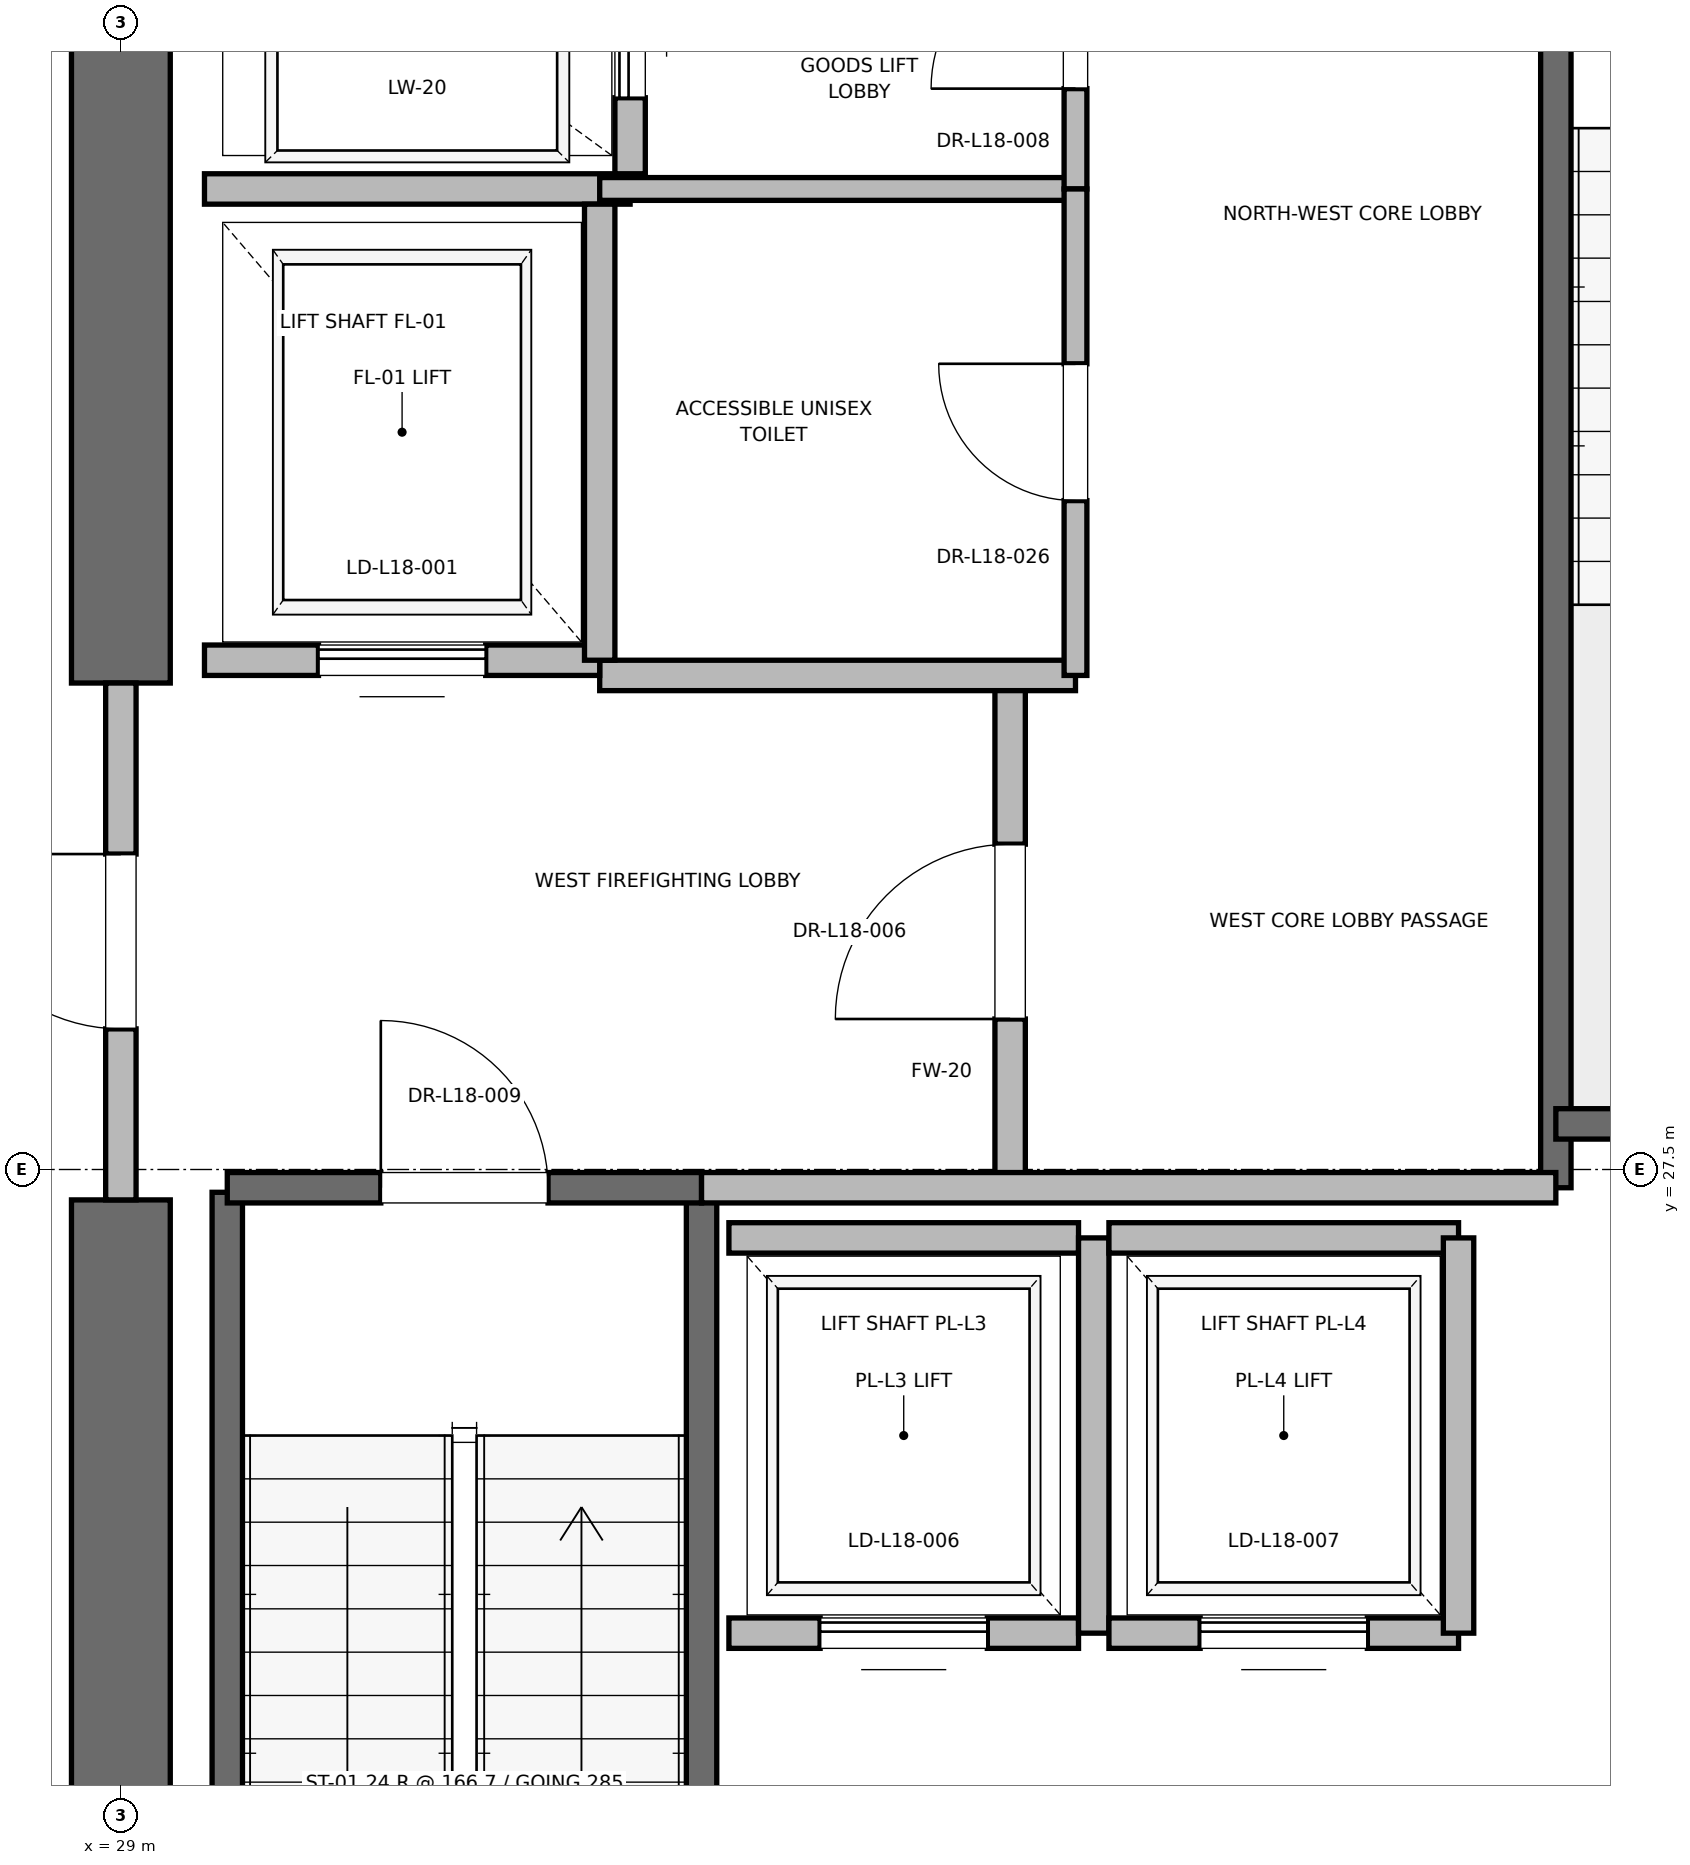
"""IFC4 building model, lengths in metres.
Left out: names, types, materials, properties, quantities, classifications, styles, units other than length and angle.
Written with IfcOpenShell. Run it as: python <this file> out.ifc"""

import sys

from ifc_helpers import new_model, si_unit, direction, frame, frame_2d, origin, place, context, subcontext, project, spatial, rectangle, extrude, element, fill, save


model = new_model("IFC4")
c1 = context("Model", 3, precision=1e-05, world=origin(), true_north=direction((0.0, 1.0)))
c2 = subcontext(c1, "Body", "Model", "MODEL_VIEW")
j1 = project(units=[si_unit("LENGTHUNIT", "METRE"), si_unit("PLANEANGLEUNIT", "RADIAN")], contexts=[c1])
p1 = place(None, origin())
s1 = spatial("IfcSite", under=j1, at=p1, CompositionType="ELEMENT")
p2 = place(p1, origin())
s2 = spatial("IfcBuilding", under=s1, at=p2, CompositionType="ELEMENT")
p3 = place(p2, frame((0.0, 0.0, 79.6)))
s3 = spatial("IfcBuildingStorey", under=s2, at=p3, CompositionType="ELEMENT", Elevation=79.6)
p4 = place(p3, frame((29.0, 18.5, 0.0), z_axis=(0.0, 0.0, 1.0), x_axis=(0.0, 1.0, 0.0)))
e1 = element("IfcWall", 1, at=p4, inside=s3, PredefinedType="SHEAR", context=c2, shape_type="SweptSolid", body=[
    extrude(rectangle(XDim=8.8, YDim=0.65, at=frame_2d((4.4, 0.0))), origin(), (0.0, 0.0, 1.0), 3.76),
])
p5 = place(p3, frame((29.0, 30.7, 0.0), z_axis=(0.0, 0.0, 1.0), x_axis=(0.0, 1.0, 0.0)))
e2 = element("IfcWall", 2, at=p5, inside=s3, PredefinedType="SHEAR", context=c2, shape_type="SweptSolid", body=[
    extrude(rectangle(XDim=5.8, YDim=0.65, at=frame_2d((2.9, 0.0))), origin(), (0.0, 0.0, 1.0), 3.76),
])
p6 = place(p3, frame((29.7, 19.2, 0.0), z_axis=(0.0, 0.0, 1.0), x_axis=(0.0, 1.0, 0.0)))
e3 = element("IfcWall", 3, at=p6, inside=s3, PredefinedType="SOLIDWALL", context=c2, shape_type="SweptSolid", body=[
    extrude(rectangle(XDim=8.15, YDim=0.2, at=frame_2d((4.075, 0.0))), origin(), (0.0, 0.0, 1.0), 3.76),
])
p7 = place(p3, frame((32.82, 18.6, 0.0), z_axis=(0.0, 0.0, 1.0), x_axis=(0.0, 1.0, 0.0)))
e4 = element("IfcWall", 4, at=p7, inside=s3, PredefinedType="SOLIDWALL", context=c2, shape_type="SweptSolid", body=[
    extrude(rectangle(XDim=8.78, YDim=0.2, at=frame_2d((4.39, 0.0))), origin(), (0.0, 0.0, 1.0), 3.76),
])
p8 = place(p3, frame((29.7, 27.38, 0.0), z_axis=(0.0, 0.0, 1.0), x_axis=(1.0, 0.0, 0.0)))
e5 = element("IfcWall", 5, at=p8, inside=s3, PredefinedType="SOLIDWALL", context=c2, shape_type="SweptSolid", body=[
    extrude(rectangle(XDim=3.12, YDim=0.2, at=frame_2d((1.56, 0.0))), origin(), (0.0, 0.0, 1.0), 3.76),
])
p9 = place(p8, frame((1.01, 0.0, 0.0)))
e6 = element("IfcOpeningElement", 6, at=p9, cuts=e5, PredefinedType="OPENING", context=c2, shape_type="SweptSolid", body=[
    extrude(rectangle(XDim=1.1, YDim=2.15, at=frame_2d((0.55, 1.075))), frame((0.0, 0.1, 0.0), z_axis=(0.0, -1.0, 0.0), x_axis=(1.0, 0.0, 0.0)), (0.0, 0.0, 1.0), 0.2),
])
p10 = place(p3, frame((38.44, 27.38, 0.0), z_axis=(0.0, 0.0, 1.0), x_axis=(0.0, 1.0, 0.0)))
e7 = element("IfcWall", 7, at=p10, inside=s3, PredefinedType="SOLIDWALL", context=c2, shape_type="SweptSolid", body=[
    extrude(rectangle(XDim=8.87, YDim=0.2, at=frame_2d((4.435, 0.0))), origin(), (0.0, 0.0, 1.0), 3.76),
])
p11 = place(p3, frame((38.44, 27.8, 0.0), z_axis=(0.0, 0.0, 1.0), x_axis=(1.0, 0.0, 0.0)))
e8 = element("IfcWall", 8, at=p11, inside=s3, PredefinedType="SOLIDWALL", context=c2, shape_type="SweptSolid", body=[
    extrude(rectangle(XDim=3.32, YDim=0.2, at=frame_2d((1.66, 0.0))), origin(), (0.0, 0.0, 1.0), 3.76),
])
p12 = place(p3, frame((34.85, 27.38, 0.0), z_axis=(0.0, 0.0, 1.0), x_axis=(0.0, 1.0, 0.0)))
e9 = element("IfcWall", 9, at=p12, inside=s3, PredefinedType="PARTITIONING", context=c2, shape_type="SweptSolid", body=[
    extrude(rectangle(XDim=3.37, YDim=0.2, at=frame_2d((1.685, 0.0))), origin(), (0.0, 0.0, 1.0), 3.76),
])
p13 = place(p12, frame((1.11, 0.0, 0.0)))
e10 = element("IfcOpeningElement", 10, at=p13, cuts=e9, PredefinedType="OPENING", context=c2, shape_type="SweptSolid", body=[
    extrude(rectangle(XDim=1.15, YDim=2.2, at=frame_2d((0.575, 1.1))), frame((0.0, 0.1, 0.0), z_axis=(0.0, -1.0, 0.0), x_axis=(1.0, 0.0, 0.0)), (0.0, 0.0, 1.0), 0.2),
])
p14 = place(p3, frame((29.0, 27.3, 0.0), z_axis=(0.0, 0.0, 1.0), x_axis=(0.0, 1.0, 0.0)))
e11 = element("IfcWall", 11, at=p14, inside=s3, PredefinedType="PARTITIONING", context=c2, shape_type="SweptSolid", body=[
    extrude(rectangle(XDim=3.4, YDim=0.2, at=frame_2d((1.7, 0.0))), origin(), (0.0, 0.0, 1.0), 2.54),
])
p15 = place(p14, frame((1.125, 0.0, 0.0)))
e12 = element("IfcOpeningElement", 12, at=p15, cuts=e11, PredefinedType="OPENING", context=c2, shape_type="SweptSolid", body=[
    extrude(rectangle(XDim=1.15, YDim=2.2, at=frame_2d((0.575, 1.1))), frame((0.0, 0.1, 0.0), z_axis=(0.0, -1.0, 0.0), x_axis=(1.0, 0.0, 0.0)), (0.0, 0.0, 1.0), 0.2),
])
p16 = place(p3, frame((32.82, 27.38, 0.0), z_axis=(0.0, 0.0, 1.0), x_axis=(1.0, 0.0, 0.0)))
e13 = element("IfcWall", 13, at=p16, inside=s3, PredefinedType="PARTITIONING", context=c2, shape_type="SweptSolid", body=[
    extrude(rectangle(XDim=5.62, YDim=0.2, at=frame_2d((2.81, 0.0))), origin(), (0.0, 0.0, 1.0), 3.76),
])
p17 = place(p3, frame((32.15, 30.75, 0.0), z_axis=(0.0, 0.0, 1.0), x_axis=(1.0, 0.0, 0.0)))
e14 = element("IfcWall", 14, at=p17, inside=s3, PredefinedType="PARTITIONING", context=c2, shape_type="SweptSolid", body=[
    extrude(rectangle(XDim=3.13, YDim=0.2, at=frame_2d((1.565, 0.0))), origin(), (0.0, 0.0, 1.0), 3.76),
])
p18 = place(p3, frame((29.55, 30.85, 0.0), z_axis=(0.0, 0.0, 1.0), x_axis=(1.0, 0.0, 0.0)))
e15 = element("IfcWall", 15, at=p18, inside=s3, PredefinedType="SOLIDWALL", context=c2, shape_type="SweptSolid", body=[
    extrude(rectangle(XDim=2.6, YDim=0.2, at=frame_2d((1.3, 0.0))), origin(), (0.0, 0.0, 1.0), 2.54),
])
p19 = place(p18, frame((0.75, 0.0, 0.0)))
e16 = element("IfcOpeningElement", 16, at=p19, cuts=e15, PredefinedType="OPENING", context=c2, shape_type="SweptSolid", body=[
    extrude(rectangle(XDim=1.1, YDim=2.2, at=frame_2d((0.55, 1.1))), frame((0.0, 0.1, 0.0), z_axis=(0.0, -1.0, 0.0), x_axis=(1.0, 0.0, 0.0)), (0.0, 0.0, 1.0), 0.2),
])
p20 = place(p3, frame((29.55, 33.95, 0.0), z_axis=(0.0, 0.0, 1.0), x_axis=(1.0, 0.0, 0.0)))
e17 = element("IfcWall", 17, at=p20, inside=s3, PredefinedType="SOLIDWALL", context=c2, shape_type="SweptSolid", body=[
    extrude(rectangle(XDim=2.8, YDim=0.2, at=frame_2d((1.4, 0.0))), origin(), (0.0, 0.0, 1.0), 3.76),
])
p21 = place(p3, frame((32.15, 30.85, 0.0), z_axis=(0.0, 0.0, 1.0), x_axis=(0.0, 1.0, 0.0)))
e18 = element("IfcWall", 18, at=p21, inside=s3, PredefinedType="SOLIDWALL", context=c2, shape_type="SweptSolid", body=[
    extrude(rectangle(XDim=3.0, YDim=0.2, at=frame_2d((1.5, 0.0))), origin(), (0.0, 0.0, 1.0), 3.76),
])
p22 = place(p3, frame((32.35, 34.05, 0.0), z_axis=(0.0, 0.0, 1.0), x_axis=(0.0, 1.0, 0.0)))
e19 = element("IfcWall", 19, at=p22, inside=s3, PredefinedType="SOLIDWALL", context=c2, shape_type="SweptSolid", body=[
    extrude(rectangle(XDim=2.1, YDim=0.2, at=frame_2d((1.05, 0.0))), origin(), (0.0, 0.0, 1.0), 3.76),
])
p23 = place(p22, frame((0.5, 0.0, 0.0)))
e20 = element("IfcOpeningElement", 20, at=p23, cuts=e19, PredefinedType="OPENING", context=c2, shape_type="SweptSolid", body=[
    extrude(rectangle(XDim=1.1, YDim=2.2, at=frame_2d((0.55, 1.1))), frame((0.0, 0.1, 0.0), z_axis=(0.0, -1.0, 0.0), x_axis=(1.0, 0.0, 0.0)), (0.0, 0.0, 1.0), 0.2),
])
p24 = place(p3, frame((33.0, 24.45, 0.0), z_axis=(0.0, 0.0, 1.0), x_axis=(1.0, 0.0, 0.0)))
e21 = element("IfcWall", 21, at=p24, inside=s3, PredefinedType="SOLIDWALL", context=c2, shape_type="SweptSolid", body=[
    extrude(rectangle(XDim=2.3, YDim=0.2, at=frame_2d((1.15, 0.0))), origin(), (0.0, 0.0, 1.0), 3.76),
])
p25 = place(p24, frame((0.6, 0.0, 0.0)))
e22 = element("IfcOpeningElement", 22, at=p25, cuts=e21, PredefinedType="OPENING", context=c2, shape_type="SweptSolid", body=[
    extrude(rectangle(XDim=1.1, YDim=2.2, at=frame_2d((0.55, 1.1))), frame((0.0, 0.1, 0.0), z_axis=(0.0, -1.0, 0.0), x_axis=(1.0, 0.0, 0.0)), (0.0, 0.0, 1.0), 0.2),
])
p26 = place(p3, frame((35.3, 27.05, 0.0), z_axis=(0.0, 0.0, 1.0), x_axis=(-1.0, 0.0, 0.0)))
e23 = element("IfcWall", 23, at=p26, inside=s3, PredefinedType="SOLIDWALL", context=c2, shape_type="SweptSolid", body=[
    extrude(rectangle(XDim=2.3, YDim=0.2, at=frame_2d((1.15, 0.0))), origin(), (0.0, 0.0, 1.0), 3.76),
])
p27 = place(p3, frame((35.4, 24.45, 0.0), z_axis=(0.0, 0.0, 1.0), x_axis=(0.0, 1.0, 0.0)))
e24 = element("IfcWall", 24, at=p27, inside=s3, PredefinedType="SOLIDWALL", context=c2, shape_type="SweptSolid", body=[
    extrude(rectangle(XDim=2.6, YDim=0.2, at=frame_2d((1.3, 0.0))), origin(), (0.0, 0.0, 1.0), 3.76),
])
p28 = place(p3, frame((35.5, 24.45, 0.0), z_axis=(0.0, 0.0, 1.0), x_axis=(1.0, 0.0, 0.0)))
e25 = element("IfcWall", 25, at=p28, inside=s3, PredefinedType="SOLIDWALL", context=c2, shape_type="SweptSolid", body=[
    extrude(rectangle(XDim=2.3, YDim=0.2, at=frame_2d((1.15, 0.0))), origin(), (0.0, 0.0, 1.0), 3.76),
])
p29 = place(p28, frame((0.6, 0.0, 0.0)))
e26 = element("IfcOpeningElement", 26, at=p29, cuts=e25, PredefinedType="OPENING", context=c2, shape_type="SweptSolid", body=[
    extrude(rectangle(XDim=1.1, YDim=2.2, at=frame_2d((0.55, 1.1))), frame((0.0, 0.1, 0.0), z_axis=(0.0, -1.0, 0.0), x_axis=(1.0, 0.0, 0.0)), (0.0, 0.0, 1.0), 0.2),
])
p30 = place(p3, frame((37.8, 27.05, 0.0), z_axis=(0.0, 0.0, 1.0), x_axis=(-1.0, 0.0, 0.0)))
e27 = element("IfcWall", 27, at=p30, inside=s3, PredefinedType="SOLIDWALL", context=c2, shape_type="SweptSolid", body=[
    extrude(rectangle(XDim=2.3, YDim=0.2, at=frame_2d((1.15, 0.0))), origin(), (0.0, 0.0, 1.0), 3.76),
])
p31 = place(p3, frame((37.8, 24.45, 0.0), z_axis=(0.0, 0.0, 1.0), x_axis=(0.0, 1.0, 0.0)))
e28 = element("IfcWall", 28, at=p31, inside=s3, PredefinedType="SOLIDWALL", context=c2, shape_type="SweptSolid", body=[
    extrude(rectangle(XDim=2.6, YDim=0.2, at=frame_2d((1.3, 0.0))), origin(), (0.0, 0.0, 1.0), 3.76),
])
p32 = place(p3, frame((32.15, 33.95, 0.0), z_axis=(0.0, 0.0, 1.0), x_axis=(1.0, 0.0, 0.0)))
e29 = element("IfcWall", 29, at=p32, inside=s3, PredefinedType="PARTITIONING", context=c2, shape_type="SweptSolid", body=[
    extrude(rectangle(XDim=3.13, YDim=0.15, at=frame_2d((1.565, 0.0))), origin(), (0.0, 0.0, 1.0), 2.85),
])
p33 = place(p3, frame((35.28, 33.95, 0.0), z_axis=(0.0, 0.0, 1.0), x_axis=(0.0, 1.0, 0.0)))
e30 = element("IfcWall", 30, at=p33, inside=s3, PredefinedType="PARTITIONING", context=c2, shape_type="SweptSolid", body=[
    extrude(rectangle(XDim=2.27, YDim=0.15, at=frame_2d((1.135, 0.0))), origin(), (0.0, 0.0, 1.0), 2.54),
])
p34 = place(p33, frame((0.66, 0.0, 0.0)))
e31 = element("IfcOpeningElement", 31, at=p34, cuts=e30, PredefinedType="OPENING", context=c2, shape_type="SweptSolid", body=[
    extrude(rectangle(XDim=0.95, YDim=2.15, at=frame_2d((0.475, 1.075))), frame((0.0, 0.075, 0.0), z_axis=(0.0, -1.0, 0.0), x_axis=(1.0, 0.0, 0.0)), (0.0, 0.0, 1.0), 0.15),
])
p35 = place(p3, frame((35.28, 30.75, 0.0), z_axis=(0.0, 0.0, 1.0), x_axis=(0.0, 1.0, 0.0)))
e32 = element("IfcWall", 32, at=p35, inside=s3, PredefinedType="PARTITIONING", context=c2, shape_type="SweptSolid", body=[
    extrude(rectangle(XDim=3.2, YDim=0.15, at=frame_2d((1.6, 0.0))), origin(), (0.0, 0.0, 1.0), 2.85),
])
p36 = place(p35, frame((1.15, 0.0, 0.0)))
e33 = element("IfcOpeningElement", 33, at=p36, cuts=e32, PredefinedType="OPENING", context=c2, shape_type="SweptSolid", body=[
    extrude(rectangle(XDim=0.9, YDim=2.1, at=frame_2d((0.45, 1.05))), frame((0.0, 0.075, 0.0), z_axis=(0.0, -1.0, 0.0), x_axis=(1.0, 0.0, 0.0)), (0.0, 0.0, 1.0), 0.15),
])
p37 = place(p9, origin())
e34 = element("IfcDoor", 34, at=p37, inside=s3, OperationType="SINGLE_SWING_LEFT", PredefinedType="DOOR", context=c2, shape_type="SweptSolid", body=[
    extrude(rectangle(XDim=1.1, YDim=2.15, at=frame_2d((0.55, 1.075))), frame((0.0, 0.025, 0.0), z_axis=(0.0, -1.0, 0.0), x_axis=(1.0, 0.0, 0.0)), (0.0, 0.0, 1.0), 0.05),
])
fill(e6, e34)
p38 = place(p13, origin())
e35 = element("IfcDoor", 35, at=p38, inside=s3, OperationType="SINGLE_SWING_LEFT", PredefinedType="DOOR", context=c2, shape_type="SweptSolid", body=[
    extrude(rectangle(XDim=1.15, YDim=2.2, at=frame_2d((0.575, 1.1))), frame((0.0, 0.025, 0.0), z_axis=(0.0, -1.0, 0.0), x_axis=(1.0, 0.0, 0.0)), (0.0, 0.0, 1.0), 0.05),
])
fill(e10, e35)
p39 = place(p15, origin())
e36 = element("IfcDoor", 36, at=p39, inside=s3, OperationType="SINGLE_SWING_RIGHT", PredefinedType="DOOR", context=c2, shape_type="SweptSolid", body=[
    extrude(rectangle(XDim=1.15, YDim=2.2, at=frame_2d((0.575, 1.1))), frame((0.0, 0.025, 0.0), z_axis=(0.0, -1.0, 0.0), x_axis=(1.0, 0.0, 0.0)), (0.0, 0.0, 1.0), 0.05),
])
fill(e12, e36)
p40 = place(p19, origin())
e37 = element("IfcDoor", 37, at=p40, inside=s3, OperationType="SLIDING_TO_RIGHT", PredefinedType="DOOR", context=c2, shape_type="SweptSolid", body=[
    extrude(rectangle(XDim=1.1, YDim=2.2, at=frame_2d((0.55, 1.1))), frame((0.0, 0.025, 0.0), z_axis=(0.0, -1.0, 0.0), x_axis=(1.0, 0.0, 0.0)), (0.0, 0.0, 1.0), 0.05),
])
fill(e16, e37)
p41 = place(p23, origin())
e38 = element("IfcDoor", 38, at=p41, inside=s3, OperationType="SLIDING_TO_RIGHT", PredefinedType="DOOR", context=c2, shape_type="SweptSolid", body=[
    extrude(rectangle(XDim=1.1, YDim=2.2, at=frame_2d((0.55, 1.1))), frame((0.0, 0.025, 0.0), z_axis=(0.0, -1.0, 0.0), x_axis=(1.0, 0.0, 0.0)), (0.0, 0.0, 1.0), 0.05),
])
fill(e20, e38)
p42 = place(p25, origin())
e39 = element("IfcDoor", 39, at=p42, inside=s3, OperationType="SLIDING_TO_RIGHT", PredefinedType="DOOR", context=c2, shape_type="SweptSolid", body=[
    extrude(rectangle(XDim=1.1, YDim=2.2, at=frame_2d((0.55, 1.1))), frame((0.0, 0.025, 0.0), z_axis=(0.0, -1.0, 0.0), x_axis=(1.0, 0.0, 0.0)), (0.0, 0.0, 1.0), 0.05),
])
fill(e22, e39)
p43 = place(p29, origin())
e40 = element("IfcDoor", 40, at=p43, inside=s3, OperationType="SLIDING_TO_RIGHT", PredefinedType="DOOR", context=c2, shape_type="SweptSolid", body=[
    extrude(rectangle(XDim=1.1, YDim=2.2, at=frame_2d((0.55, 1.1))), frame((0.0, 0.025, 0.0), z_axis=(0.0, -1.0, 0.0), x_axis=(1.0, 0.0, 0.0)), (0.0, 0.0, 1.0), 0.05),
])
fill(e26, e40)
p44 = place(p34, origin())
e41 = element("IfcDoor", 41, at=p44, inside=s3, OperationType="SINGLE_SWING_LEFT", PredefinedType="DOOR", context=c2, shape_type="SweptSolid", body=[
    extrude(rectangle(XDim=0.95, YDim=2.15, at=frame_2d((0.475, 1.075))), frame((0.0, 0.025, 0.0), z_axis=(0.0, -1.0, 0.0), x_axis=(1.0, 0.0, 0.0)), (0.0, 0.0, 1.0), 0.05),
])
fill(e31, e41)
p45 = place(p36, origin())
e42 = element("IfcDoor", 42, at=p45, inside=s3, OperationType="SINGLE_SWING_RIGHT", PredefinedType="DOOR", context=c2, shape_type="SweptSolid", body=[
    extrude(rectangle(XDim=0.9, YDim=2.1, at=frame_2d((0.45, 1.05))), frame((0.0, 0.025, 0.0), z_axis=(0.0, -1.0, 0.0), x_axis=(1.0, 0.0, 0.0)), (0.0, 0.0, 1.0), 0.05),
])
fill(e33, e42)
save(model, sys.argv[1])
